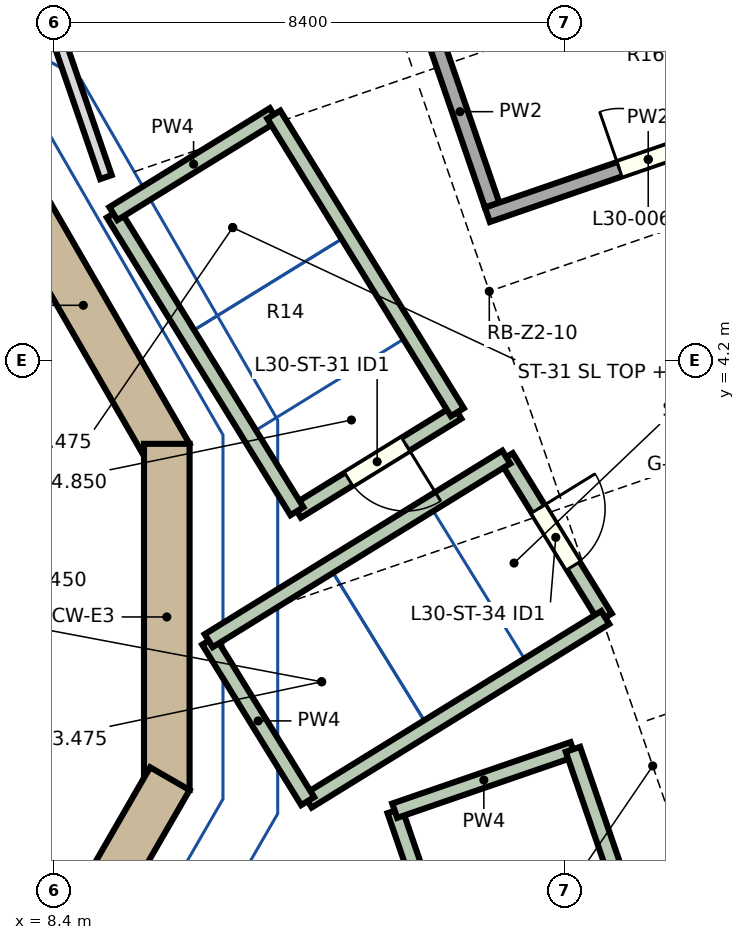
"""IFC4 building model, lengths in metres.
Left out: names, types, materials, properties, quantities, classifications, styles, units other than length and angle.
Written with IfcOpenShell. Run it as: python <this file> out.ifc"""

import sys

from ifc_helpers import new_model, si_unit, direction, frame, frame_2d, origin, place, context, subcontext, project, spatial, rectangle, extrude, element, fill, save


model = new_model("IFC4")
c1 = context("Model", 3, precision=1e-05, world=origin(), true_north=direction((0.0, 1.0)))
c2 = subcontext(c1, "Body", "Model", "MODEL_VIEW")
j1 = project(units=[si_unit("LENGTHUNIT", "METRE"), si_unit("PLANEANGLEUNIT", "RADIAN")], contexts=[c1])
p1 = place(None, origin())
s1 = spatial("IfcSite", under=j1, at=p1, CompositionType="ELEMENT")
p2 = place(p1, origin())
s2 = spatial("IfcBuilding", under=s1, at=p2, CompositionType="ELEMENT")
p3 = place(p2, frame((0.0, 0.0, 142.1)))
s3 = spatial("IfcBuildingStorey", under=s2, at=p3, CompositionType="ELEMENT", Elevation=142.1)
p4 = place(p3, frame((7.453, 7.591, 0.0), z_axis=(0.0, 0.0, 1.0), x_axis=(0.500021842983, -0.866012792365, 0.0)))
e1 = element("IfcWall", 1, at=p4, inside=s3, PredefinedType="SHEAR", context=c2, shape_type="SweptSolid", body=[
    extrude(rectangle(XDim=5.694, YDim=0.75, at=frame_2d((2.847, 0.0))), origin(), (0.0, 0.0, 1.0), 5.5),
])
p5 = place(p3, frame((10.25, 2.847, 0.0), z_axis=(0.0, 0.0, 1.0), x_axis=(0.0, -1.0, 0.0)))
e2 = element("IfcWall", 2, at=p5, inside=s3, PredefinedType="SHEAR", context=c2, shape_type="SweptSolid", body=[
    extrude(rectangle(XDim=5.694, YDim=0.75, at=frame_2d((2.847, 0.0))), origin(), (0.0, 0.0, 1.0), 5.5),
])
p6 = place(p3, frame((10.301, -2.659, 0.0), z_axis=(0.0, 0.0, 1.0), x_axis=(-0.500021842983, -0.866012792365, 0.0)))
e3 = element("IfcWall", 3, at=p6, inside=s3, PredefinedType="SHEAR", context=c2, shape_type="SweptSolid", body=[
    extrude(rectangle(XDim=5.694, YDim=0.75, at=frame_2d((2.847, 0.0))), origin(), (0.0, 0.0, 1.0), 5.5),
])
p7 = place(p3, frame((9.249, 7.233, 0.0), z_axis=(0.0, 0.0, 1.0), x_axis=(-0.325597252795, 0.945508555737, 0.0)))
e4 = element("IfcWall", 4, at=p7, inside=s3, PredefinedType="PARTITIONING", context=c2, shape_type="SweptSolid", body=[
    extrude(rectangle(XDim=5.814, YDim=0.2, at=frame_2d((2.907, 0.0))), origin(), (0.0, 0.0, 1.0), 4.3),
])
p8 = place(p3, frame((15.6, 6.773, 0.0), z_axis=(0.0, 0.0, 1.0), x_axis=(-0.325587809767, 0.945511807505, 0.0)))
e5 = element("IfcWall", 5, at=p8, inside=s3, PredefinedType="PARTITIONING", context=c2, shape_type="SweptSolid", body=[
    extrude(rectangle(XDim=3.25, YDim=0.25, at=frame_2d((1.625, 0.0))), origin(), (0.0, 0.0, 1.0), 4.3),
])
p9 = place(p3, frame((15.523, 6.614, 0.0), z_axis=(0.0, 0.0, 1.0), x_axis=(0.945512482082, 0.325585850778, 0.0)))
e6 = element("IfcWall", 6, at=p9, inside=s3, PredefinedType="PARTITIONING", context=c2, shape_type="SweptSolid", body=[
    extrude(rectangle(XDim=5.595, YDim=0.25, at=frame_2d((2.797, 0.0))), origin(), (0.0, 0.0, 1.0), 4.3),
])
p10 = place(p9, frame((2.297, 0.0, 0.0)))
e7 = element("IfcOpeningElement", 7, at=p10, cuts=e6, PredefinedType="OPENING", context=c2, shape_type="SweptSolid", body=[
    extrude(rectangle(XDim=1.0, YDim=2.1, at=frame_2d((0.5, 1.05))), frame((0.0, 0.135, 0.0), z_axis=(0.0, -1.0, 0.0), x_axis=(1.0, 0.0, 0.0)), (0.0, 0.0, 1.0), 0.27),
])
p11 = place(p3, frame((29.717, -8.594, 0.0), z_axis=(0.0, 0.0, 1.0), x_axis=(-0.325569225198, 0.945518206913, 0.0)))
e8 = element("IfcWall", 8, at=p11, inside=s3, PredefinedType="PARTITIONING", context=c2, shape_type="SweptSolid", body=[
    extrude(rectangle(XDim=35.6, YDim=0.2, at=frame_2d((17.8, 0.0))), origin(), (0.0, 0.0, 1.0), 4.3),
])
p12 = place(p3, frame((15.029, 3.367, 0.0), z_axis=(0.0, 0.0, 1.0), x_axis=(-0.851111635158, -0.52498474692, 0.0)))
e9 = element("IfcWall", 9, at=p12, inside=s3, PredefinedType="SOLIDWALL", context=c2, shape_type="SweptSolid", body=[
    extrude(rectangle(XDim=3.1, YDim=0.25, at=frame_2d((1.55, 0.0))), origin(), (0.0, 0.0, 1.0), 4.3),
])
p13 = place(p12, frame((1.0, 0.0, 0.0)))
e10 = element("IfcOpeningElement", 10, at=p13, cuts=e9, PredefinedType="OPENING", context=c2, shape_type="SweptSolid", body=[
    extrude(rectangle(XDim=1.1, YDim=2.1, at=frame_2d((0.55, 1.05))), frame((0.0, 0.135, 0.0), z_axis=(0.0, -1.0, 0.0), x_axis=(1.0, 0.0, 0.0)), (0.0, 0.0, 1.0), 0.27),
])
p14 = place(p3, frame((12.39, 1.739, 0.0), z_axis=(0.0, 0.0, 1.0), x_axis=(-0.524959451453, 0.85112723745, 0.0)))
e11 = element("IfcWall", 11, at=p14, inside=s3, PredefinedType="SOLIDWALL", context=c2, shape_type="SweptSolid", body=[
    extrude(rectangle(XDim=5.75, YDim=0.25, at=frame_2d((2.875, 0.0))), origin(), (0.0, 0.0, 1.0), 4.3),
])
p15 = place(p3, frame((9.372, 6.633, 0.0), z_axis=(0.0, 0.0, 1.0), x_axis=(0.851111635158, 0.52498474692, 0.0)))
e12 = element("IfcWall", 12, at=p15, inside=s3, PredefinedType="SOLIDWALL", context=c2, shape_type="SweptSolid", body=[
    extrude(rectangle(XDim=3.1, YDim=0.25, at=frame_2d((1.55, 0.0))), origin(), (0.0, 0.0, 1.0), 4.3),
])
p16 = place(p3, frame((12.01, 8.261, 0.0), z_axis=(0.0, 0.0, 1.0), x_axis=(0.524959451453, -0.85112723745, 0.0)))
e13 = element("IfcWall", 13, at=p16, inside=s3, PredefinedType="SOLIDWALL", context=c2, shape_type="SweptSolid", body=[
    extrude(rectangle(XDim=5.75, YDim=0.25, at=frame_2d((2.875, 0.0))), origin(), (0.0, 0.0, 1.0), 4.3),
])
p17 = place(p3, frame((15.833, 2.628, 0.0), z_axis=(0.0, 0.0, 1.0), x_axis=(0.52498474692, -0.851111635158, 0.0)))
e14 = element("IfcWall", 14, at=p17, inside=s3, PredefinedType="SOLIDWALL", context=c2, shape_type="SweptSolid", body=[
    extrude(rectangle(XDim=3.1, YDim=0.25, at=frame_2d((1.55, 0.0))), origin(), (0.0, 0.0, 1.0), 4.3),
])
p18 = place(p17, frame((1.0, 0.0, 0.0)))
e15 = element("IfcOpeningElement", 15, at=p18, cuts=e14, PredefinedType="OPENING", context=c2, shape_type="SweptSolid", body=[
    extrude(rectangle(XDim=1.1, YDim=2.1, at=frame_2d((0.55, 1.05))), frame((0.0, 0.135, 0.0), z_axis=(0.0, -1.0, 0.0), x_axis=(1.0, 0.0, 0.0)), (0.0, 0.0, 1.0), 0.27),
])
p19 = place(p3, frame((17.461, -0.01, 0.0), z_axis=(0.0, 0.0, 1.0), x_axis=(-0.851115535943, -0.524978422868, 0.0)))
e16 = element("IfcWall", 16, at=p19, inside=s3, PredefinedType="SOLIDWALL", context=c2, shape_type="SweptSolid", body=[
    extrude(rectangle(XDim=5.75, YDim=0.25, at=frame_2d((2.875, 0.0))), origin(), (0.0, 0.0, 1.0), 4.3),
])
p20 = place(p3, frame((12.567, -3.029, 0.0), z_axis=(0.0, 0.0, 1.0), x_axis=(-0.525041793222, 0.85107644508, 0.0)))
e17 = element("IfcWall", 17, at=p20, inside=s3, PredefinedType="SOLIDWALL", context=c2, shape_type="SweptSolid", body=[
    extrude(rectangle(XDim=3.1, YDim=0.25, at=frame_2d((1.55, 0.0))), origin(), (0.0, 0.0, 1.0), 4.3),
])
p21 = place(p3, frame((10.939, -0.39, 0.0), z_axis=(0.0, 0.0, 1.0), x_axis=(0.85112723745, 0.524959451453, 0.0)))
e18 = element("IfcWall", 18, at=p21, inside=s3, PredefinedType="SOLIDWALL", context=c2, shape_type="SweptSolid", body=[
    extrude(rectangle(XDim=5.75, YDim=0.25, at=frame_2d((2.875, 0.0))), origin(), (0.0, 0.0, 1.0), 4.3),
])
p22 = place(p3, frame((15.871, -8.623, 0.0), z_axis=(0.0, 0.0, 1.0), x_axis=(-0.325612503367, 0.945503303882, 0.0)))
e19 = element("IfcWall", 19, at=p22, inside=s3, PredefinedType="SOLIDWALL", context=c2, shape_type="SweptSolid", body=[
    extrude(rectangle(XDim=5.75, YDim=0.25, at=frame_2d((2.875, 0.0))), origin(), (0.0, 0.0, 1.0), 4.3),
])
p23 = place(p3, frame((13.998, -3.186, 0.0), z_axis=(0.0, 0.0, 1.0), x_axis=(0.945518510753, 0.325568342783, 0.0)))
e20 = element("IfcWall", 20, at=p23, inside=s3, PredefinedType="SOLIDWALL", context=c2, shape_type="SweptSolid", body=[
    extrude(rectangle(XDim=3.1, YDim=0.25, at=frame_2d((1.55, 0.0))), origin(), (0.0, 0.0, 1.0), 4.3),
])
p24 = place(p3, frame((16.929, -2.177, 0.0), z_axis=(0.0, 0.0, 1.0), x_axis=(0.32557454588, -0.945516374832, 0.0)))
e21 = element("IfcWall", 21, at=p24, inside=s3, PredefinedType="SOLIDWALL", context=c2, shape_type="SweptSolid", body=[
    extrude(rectangle(XDim=5.75, YDim=0.25, at=frame_2d((2.875, 0.0))), origin(), (0.0, 0.0, 1.0), 4.3),
])
p25 = place(p10, origin())
e22 = element("IfcDoor", 22, at=p25, inside=s3, PredefinedType="DOOR", context=c2, shape_type="SweptSolid", body=[
    extrude(rectangle(XDim=1.0, YDim=2.1, at=frame_2d((0.5, 1.05))), frame((0.0, 0.025, 0.0), z_axis=(0.0, -1.0, 0.0), x_axis=(1.0, 0.0, 0.0)), (0.0, 0.0, 1.0), 0.05),
])
fill(e7, e22)
p26 = place(p13, origin())
e23 = element("IfcDoor", 23, at=p26, inside=s3, OperationType="NOTDEFINED", PredefinedType="DOOR", context=c2, shape_type="SweptSolid", body=[
    extrude(rectangle(XDim=1.1, YDim=2.1, at=frame_2d((0.55, 1.05))), frame((0.0, 0.025, 0.0), z_axis=(0.0, -1.0, 0.0), x_axis=(1.0, 0.0, 0.0)), (0.0, 0.0, 1.0), 0.05),
])
fill(e10, e23)
p27 = place(p18, origin())
e24 = element("IfcDoor", 24, at=p27, inside=s3, OperationType="NOTDEFINED", PredefinedType="DOOR", context=c2, shape_type="SweptSolid", body=[
    extrude(rectangle(XDim=1.1, YDim=2.1, at=frame_2d((0.55, 1.05))), frame((0.0, 0.025, 0.0), z_axis=(0.0, -1.0, 0.0), x_axis=(1.0, 0.0, 0.0)), (0.0, 0.0, 1.0), 0.05),
])
fill(e15, e24)
save(model, sys.argv[1])
